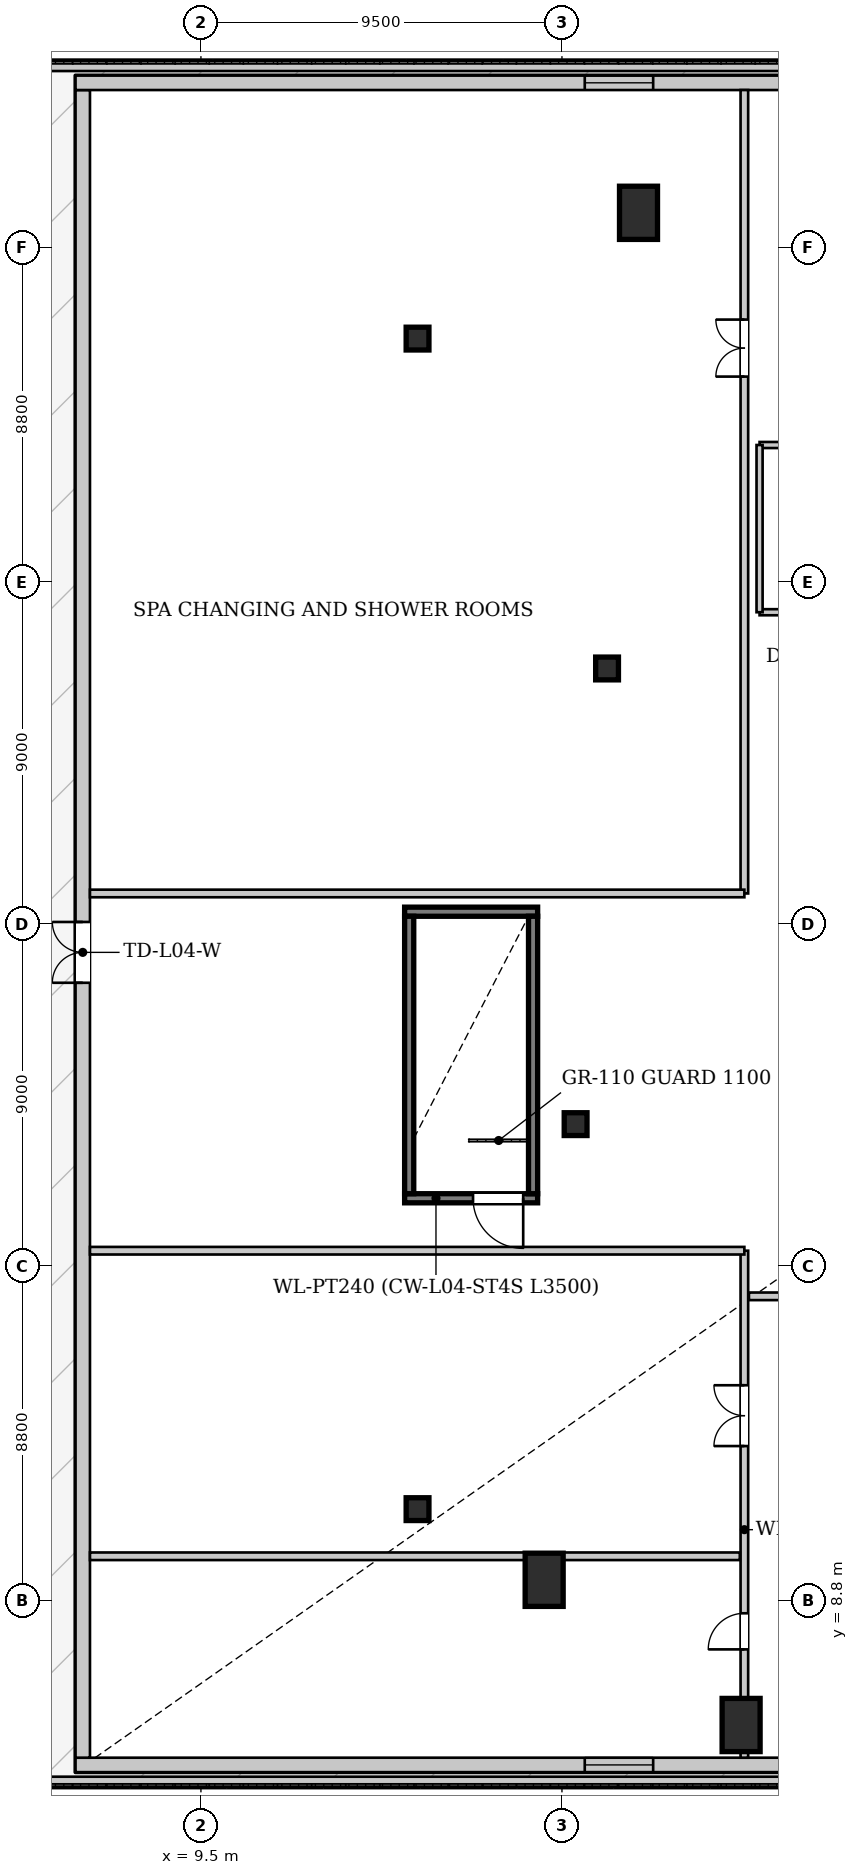
"""IFC4 building model, lengths in metres.
Left out: names, types, materials, properties, quantities, classifications, styles, units other than length and angle.
Written with IfcOpenShell. Run it as: python <this file> out.ifc"""

import sys

from ifc_helpers import new_model, si_unit, direction, frame, frame_2d, origin, origin_2d, place, context, subcontext, project, spatial, rectangle, hollow_rectangle, extrude, source, transform, mapped, element, fill, save


model = new_model("IFC4")
c1 = context("Model", 3, precision=1e-05, world=origin(), true_north=direction((0.0, 1.0)))
c2 = subcontext(c1, "Body", "Model", "MODEL_VIEW")
j1 = project(units=[si_unit("LENGTHUNIT", "METRE"), si_unit("PLANEANGLEUNIT", "RADIAN")], contexts=[c1])
p1 = place(None, origin())
s1 = spatial("IfcSite", under=j1, at=p1, CompositionType="ELEMENT")
p2 = place(p1, origin())
s2 = spatial("IfcBuilding", under=s1, at=p2, CompositionType="ELEMENT")
p3 = place(p2, frame((0.0, 0.0, 20.1)))
s3 = spatial("IfcBuildingStorey", under=s2, at=p3, CompositionType="ELEMENT", Elevation=20.1)
m1 = source(origin(), c2, "Body", "SweptSolid", [
    extrude(rectangle(XDim=1.0, YDim=1.4, at=origin_2d()), origin(), (0.0, 0.0, 1.0), 4.335),
])
for number, where, z_axis, x_axis in (
    (1, (21.014, 45.309, 0.0), (0.0, 0.0, 1.0), (1.0, 0.0, 0.0)),
    (2, (18.532, 9.341, 0.0), (0.0, 0.0, 1.0), (1.0, 0.0, 0.0)),
    (3, (23.714, 5.52, 0.0), (0.0, 0.0, 1.0), (1.0, 0.0, 0.0)),
):
    element("IfcColumn", number, at=place(p3, frame(where, z_axis=z_axis, x_axis=x_axis)), inside=s3, PredefinedType="COLUMN", context=c2, shape_type="MappedRepresentation", body=[
        mapped(m1, transform((0.0, 0.0, 0.0), x_axis=(1.0, 0.0, 0.0), y_axis=(0.0, 1.0, 0.0), z_axis=(0.0, 0.0, 1.0), scale=1.0)),
    ])
m2 = source(origin(), c2, "Body", "SweptSolid", [
    extrude(hollow_rectangle(XDim=0.6, YDim=0.6, WallThickness=0.035, at=origin_2d()), origin(), (0.0, 0.0, 1.0), 4.335),
])
for number, where, z_axis, x_axis in (
    (4, (15.2, 11.2, 0.0), (0.0, 0.0, 1.0), (1.0, 0.0, 0.0)),
    (5, (15.2, 42.0, 0.0), (0.0, 0.0, 1.0), (1.0, 0.0, 0.0)),
):
    element("IfcColumn", number, at=place(p3, frame(where, z_axis=z_axis, x_axis=x_axis)), inside=s3, PredefinedType="COLUMN", context=c2, shape_type="MappedRepresentation", body=[
        mapped(m2, transform((0.0, 0.0, 0.0), x_axis=(1.0, 0.0, 0.0), y_axis=(0.0, 1.0, 0.0), z_axis=(0.0, 0.0, 1.0), scale=1.0)),
    ])
m3 = source(origin(), c2, "Body", "SweptSolid", [
    extrude(hollow_rectangle(XDim=0.6, YDim=0.6, WallThickness=0.035, at=origin_2d()), origin(), (0.0, 0.0, 1.0), 3.28),
])
for number, where, z_axis, x_axis in (
    (6, (20.187, 33.32, 0.0), (0.0, 0.0, 1.0), (1.0, 0.0, 0.0)),
    (7, (19.359, 21.331, 0.0), (0.0, 0.0, 1.0), (1.0, 0.0, 0.0)),
):
    element("IfcColumn", number, at=place(p3, frame(where, z_axis=z_axis, x_axis=x_axis)), inside=s3, PredefinedType="COLUMN", context=c2, shape_type="MappedRepresentation", body=[
        mapped(m3, transform((0.0, 0.0, 0.0), x_axis=(1.0, 0.0, 0.0), y_axis=(0.0, 1.0, 0.0), z_axis=(0.0, 0.0, 1.0), scale=1.0)),
    ])
p4 = place(p3, frame((34.8, 4.47, 0.0), z_axis=(0.0, 0.0, 1.0), x_axis=(-1.0, 0.0, 0.0)))
e8 = element("IfcWall", 8, at=p4, inside=s3, PredefinedType="SOLIDWALL", context=c2, shape_type="SweptSolid", body=[
    extrude(rectangle(XDim=28.6, YDim=0.38, at=frame_2d((14.3, 0.0))), origin(), (0.0, 0.0, 1.0), 3.2),
])
p5 = place(p4, frame((13.4, 0.0, 0.68)))
e9 = element("IfcOpeningElement", 9, at=p5, cuts=e8, PredefinedType="OPENING", context=c2, shape_type="SweptSolid", body=[
    extrude(rectangle(XDim=1.8, YDim=2.4, at=frame_2d((0.9, 1.2))), frame((0.0, 0.2, 0.0), z_axis=(0.0, -1.0, 0.0), x_axis=(1.0, 0.0, 0.0)), (0.0, 0.0, 1.0), 0.4),
])
p6 = place(p3, frame((6.39, 4.66, 0.0), z_axis=(0.0, 0.0, 1.0), x_axis=(0.0, 1.0, 0.0)))
e10 = element("IfcWall", 10, at=p6, inside=s3, PredefinedType="SOLIDWALL", context=c2, shape_type="SweptSolid", body=[
    extrude(rectangle(XDim=43.88, YDim=0.38, at=frame_2d((21.94, 0.0))), origin(), (0.0, 0.0, 1.0), 3.2),
])
p7 = place(p6, frame((20.39, 0.0, 0.0)))
e11 = element("IfcOpeningElement", 11, at=p7, cuts=e10, PredefinedType="OPENING", context=c2, shape_type="SweptSolid", body=[
    extrude(rectangle(XDim=1.6, YDim=2.3, at=frame_2d((0.8, 1.15))), frame((0.0, 0.2, 0.0), z_axis=(0.0, -1.0, 0.0), x_axis=(1.0, 0.0, 0.0)), (0.0, 0.0, 1.0), 0.4),
])
p8 = place(p3, frame((6.2, 48.73, 0.0), z_axis=(0.0, 0.0, 1.0), x_axis=(1.0, 0.0, 0.0)))
e12 = element("IfcWall", 12, at=p8, inside=s3, PredefinedType="SOLIDWALL", context=c2, shape_type="SweptSolid", body=[
    extrude(rectangle(XDim=28.6, YDim=0.38, at=frame_2d((14.3, 0.0))), origin(), (0.0, 0.0, 1.0), 3.2),
])
p9 = place(p8, frame((13.4, 0.0, 0.68)))
e13 = element("IfcOpeningElement", 13, at=p9, cuts=e12, PredefinedType="OPENING", context=c2, shape_type="SweptSolid", body=[
    extrude(rectangle(XDim=1.8, YDim=2.4, at=frame_2d((0.9, 1.2))), frame((0.0, 0.2, 0.0), z_axis=(0.0, -1.0, 0.0), x_axis=(1.0, 0.0, 0.0)), (0.0, 0.0, 1.0), 0.4),
])
for number, where, z_axis, x_axis in (
    (14, (5.35, 4.02, 0.0), (0.0, 0.0, 1.0), (1.0, 0.0, 0.0)),
    (15, (5.35, 49.18, 0.0), (0.0, 0.0, 1.0), (1.0, 0.0, 0.0)),
):
    element("IfcWall", number, at=place(p3, frame(where, z_axis=z_axis, x_axis=x_axis)), inside=s3, PredefinedType="PARAPET", context=c2, shape_type="SweptSolid", body=[
        extrude(rectangle(XDim=65.3, YDim=0.28, at=frame_2d((32.65, 0.0))), origin(), (0.0, 0.0, 1.0), 0.45),
    ])
p10 = place(p3, frame((18.36, 19.38, 0.0), z_axis=(0.0, 0.0, 1.0), x_axis=(-1.0, 0.0, 0.0)))
e16 = element("IfcWall", 16, at=p10, inside=s3, PredefinedType="PARTITIONING", context=c2, shape_type="SweptSolid", body=[
    extrude(rectangle(XDim=3.5, YDim=0.24, at=frame_2d((1.75, 0.0))), origin(), (0.0, 0.0, 1.0), 4.08),
])
p11 = place(p10, frame((0.38, 0.0, 0.0)))
e17 = element("IfcOpeningElement", 17, at=p11, cuts=e16, PredefinedType="OPENING", context=c2, shape_type="SweptSolid", body=[
    extrude(rectangle(XDim=1.32, YDim=2.2, at=frame_2d((0.66, 1.1))), frame((0.0, 0.13, 0.0), z_axis=(0.0, -1.0, 0.0), x_axis=(1.0, 0.0, 0.0)), (0.0, 0.0, 1.0), 0.26),
])
p12 = place(p3, frame((14.86, 26.92, 0.0), z_axis=(0.0, 0.0, 1.0), x_axis=(1.0, 0.0, 0.0)))
e18 = element("IfcWall", 18, at=p12, inside=s3, PredefinedType="PARTITIONING", context=c2, shape_type="SweptSolid", body=[
    extrude(rectangle(XDim=3.5, YDim=0.24, at=frame_2d((1.75, 0.0))), origin(), (0.0, 0.0, 1.0), 4.08),
])
for number, where, z_axis, x_axis in (
    (19, (14.98, 19.5, 0.0), (0.0, 0.0, 1.0), (0.0, 1.0, 0.0)),
    (20, (18.24, 26.8, 0.0), (0.0, 0.0, 1.0), (0.0, -1.0, 0.0)),
):
    element("IfcWall", number, at=place(p3, frame(where, z_axis=z_axis, x_axis=x_axis)), inside=s3, PredefinedType="PARTITIONING", context=c2, shape_type="SweptSolid", body=[
        extrude(rectangle(XDim=7.3, YDim=0.24, at=frame_2d((3.65, 0.0))), origin(), (0.0, 0.0, 1.0), 4.08),
    ])
p13 = place(p3, frame((23.8, 4.66, 0.0), z_axis=(0.0, 0.0, 1.0), x_axis=(0.0, 1.0, 0.0)))
e21 = element("IfcWall", 21, at=p13, inside=s3, PredefinedType="PARTITIONING", context=c2, shape_type="SweptSolid", body=[
    extrude(rectangle(XDim=13.34, YDim=0.2, at=frame_2d((6.67, 0.0))), origin(), (0.0, 0.0, 1.0), 3.43),
])
p14 = place(p13, frame((2.85, 0.0, 0.0)))
e22 = element("IfcOpeningElement", 22, at=p14, cuts=e21, PredefinedType="OPENING", context=c2, shape_type="SweptSolid", body=[
    extrude(rectangle(XDim=0.95, YDim=2.1, at=frame_2d((0.475, 1.05))), frame((0.0, 0.11, 0.0), z_axis=(0.0, -1.0, 0.0), x_axis=(1.0, 0.0, 0.0)), (0.0, 0.0, 1.0), 0.22),
])
p15 = place(p13, frame((8.2, 0.0, 0.0)))
e23 = element("IfcOpeningElement", 23, at=p15, cuts=e21, PredefinedType="OPENING", context=c2, shape_type="SweptSolid", body=[
    extrude(rectangle(XDim=1.6, YDim=2.2, at=frame_2d((0.8, 1.1))), frame((0.0, 0.11, 0.0), z_axis=(0.0, -1.0, 0.0), x_axis=(1.0, 0.0, 0.0)), (0.0, 0.0, 1.0), 0.22),
])
p16 = place(p3, frame((6.58, 9.96, 0.0), z_axis=(0.0, 0.0, 1.0), x_axis=(1.0, 0.0, 0.0)))
e24 = element("IfcWall", 24, at=p16, inside=s3, PredefinedType="PARTITIONING", context=c2, shape_type="SweptSolid", body=[
    extrude(rectangle(XDim=17.1, YDim=0.2, at=frame_2d((8.55, 0.0))), origin(), (0.0, 0.0, 1.0), 3.43),
])
p17 = place(p3, frame((6.58, 18.0, 0.0), z_axis=(0.0, 0.0, 1.0), x_axis=(1.0, 0.0, 0.0)))
e25 = element("IfcWall", 25, at=p17, inside=s3, PredefinedType="PARTITIONING", context=c2, shape_type="SweptSolid", body=[
    extrude(rectangle(XDim=17.22, YDim=0.2, at=frame_2d((8.61, 0.0))), origin(), (0.0, 0.0, 1.0), 3.43),
])
p18 = place(p3, frame((23.8, 27.4, 0.0), z_axis=(0.0, 0.0, 1.0), x_axis=(0.0, 1.0, 0.0)))
e26 = element("IfcWall", 26, at=p18, inside=s3, PredefinedType="PARTITIONING", context=c2, shape_type="SweptSolid", body=[
    extrude(rectangle(XDim=21.14, YDim=0.2, at=frame_2d((10.57, 0.0))), origin(), (0.0, 0.0, 1.0), 3.43),
])
p19 = place(p18, frame((13.6, 0.0, 0.0)))
e27 = element("IfcOpeningElement", 27, at=p19, cuts=e26, PredefinedType="OPENING", context=c2, shape_type="SweptSolid", body=[
    extrude(rectangle(XDim=1.5, YDim=2.25, at=frame_2d((0.75, 1.125))), frame((0.0, 0.11, 0.0), z_axis=(0.0, -1.0, 0.0), x_axis=(1.0, 0.0, 0.0)), (0.0, 0.0, 1.0), 0.22),
])
p20 = place(p3, frame((6.58, 27.4, 0.0), z_axis=(0.0, 0.0, 1.0), x_axis=(1.0, 0.0, 0.0)))
e28 = element("IfcWall", 28, at=p20, inside=s3, PredefinedType="PARTITIONING", context=c2, shape_type="SweptSolid", body=[
    extrude(rectangle(XDim=17.22, YDim=0.2, at=frame_2d((8.61, 0.0))), origin(), (0.0, 0.0, 1.0), 3.43),
])
p21 = place(p3, frame((23.92, 16.8, 0.0), z_axis=(0.0, 0.0, 1.0), x_axis=(1.0, 0.0, 0.0)))
e29 = element("IfcWall", 29, at=p21, inside=s3, PredefinedType="PARTITIONING", context=c2, shape_type="SweptSolid", body=[
    extrude(rectangle(XDim=28.16, YDim=0.2, at=frame_2d((14.08, 0.0))), origin(), (0.0, 0.0, 1.0), 3.43),
])
p22 = place(p21, frame((13.5, 0.0, 0.0)))
e30 = element("IfcOpeningElement", 30, at=p22, cuts=e29, PredefinedType="OPENING", context=c2, shape_type="SweptSolid", body=[
    extrude(rectangle(XDim=1.6, YDim=2.2, at=frame_2d((0.8, 1.1))), frame((0.0, 0.11, 0.0), z_axis=(0.0, -1.0, 0.0), x_axis=(1.0, 0.0, 0.0)), (0.0, 0.0, 1.0), 0.22),
])
p23 = place(p3, frame((24.2, 34.8, 0.0), z_axis=(0.0, 0.0, 1.0), x_axis=(1.0, 0.0, 0.0)))
e31 = element("IfcWall", 31, at=p23, inside=s3, PredefinedType="PARTITIONING", context=c2, shape_type="SweptSolid", body=[
    extrude(rectangle(XDim=6.6, YDim=0.16, at=frame_2d((3.3, 0.0))), origin(), (0.0, 0.0, 1.0), 3.43),
])
p24 = place(p23, frame((1.0, 0.0, 0.0)))
e32 = element("IfcOpeningElement", 32, at=p24, cuts=e31, PredefinedType="OPENING", context=c2, shape_type="SweptSolid", body=[
    extrude(rectangle(XDim=0.9, YDim=2.1, at=frame_2d((0.45, 1.05))), frame((0.0, 0.09, 0.0), z_axis=(0.0, -1.0, 0.0), x_axis=(1.0, 0.0, 0.0)), (0.0, 0.0, 1.0), 0.18),
])
p25 = place(p23, frame((4.4, 0.0, 0.0)))
e33 = element("IfcOpeningElement", 33, at=p25, cuts=e31, PredefinedType="OPENING", context=c2, shape_type="SweptSolid", body=[
    extrude(rectangle(XDim=0.9, YDim=2.1, at=frame_2d((0.45, 1.05))), frame((0.0, 0.09, 0.0), z_axis=(0.0, -1.0, 0.0), x_axis=(1.0, 0.0, 0.0)), (0.0, 0.0, 1.0), 0.18),
])
p26 = place(p3, frame((24.2, 39.2, 0.0), z_axis=(0.0, 0.0, 1.0), x_axis=(1.0, 0.0, 0.0)))
e34 = element("IfcWall", 34, at=p26, inside=s3, PredefinedType="PARTITIONING", context=c2, shape_type="SweptSolid", body=[
    extrude(rectangle(XDim=6.6, YDim=0.16, at=frame_2d((3.3, 0.0))), origin(), (0.0, 0.0, 1.0), 3.43),
])
p27 = place(p3, frame((24.2, 34.8, 0.0), z_axis=(0.0, 0.0, 1.0), x_axis=(0.0, 1.0, 0.0)))
e35 = element("IfcWall", 35, at=p27, inside=s3, PredefinedType="PARTITIONING", context=c2, shape_type="SweptSolid", body=[
    extrude(rectangle(XDim=4.4, YDim=0.16, at=frame_2d((2.2, 0.0))), origin(), (0.0, 0.0, 1.0), 3.43),
])
m4 = source(origin(), c2, "Body", "SweptSolid", [
    extrude(rectangle(XDim=1.6, YDim=2.3, at=frame_2d((0.8, 1.15))), frame((0.0, 0.025, 0.0), z_axis=(0.0, -1.0, 0.0), x_axis=(1.0, 0.0, 0.0)), (0.0, 0.0, 1.0), 0.05),
])
p28 = place(p7, origin())
e36 = element("IfcDoor", 36, at=p28, inside=s3, OperationType="DOUBLE_DOOR_SINGLE_SWING", PredefinedType="DOOR", context=c2, shape_type="MappedRepresentation", body=[
    mapped(m4, transform((0.0, 0.0, 0.0), x_axis=(1.0, 0.0, 0.0), y_axis=(0.0, 1.0, 0.0), z_axis=(0.0, 0.0, 1.0), scale=1.0)),
])
fill(e11, e36)
m5 = source(origin(), c2, "Body", "SweptSolid", [
    extrude(rectangle(XDim=1.8, YDim=2.4, at=frame_2d((0.9, 1.2))), frame((0.0, 0.03, 0.0), z_axis=(0.0, -1.0, 0.0), x_axis=(1.0, 0.0, 0.0)), (0.0, 0.0, 1.0), 0.06),
])
p29 = place(p5, origin())
e37 = element("IfcWindow", 37, at=p29, inside=s3, PartitioningType="SINGLE_PANEL", PredefinedType="WINDOW", context=c2, shape_type="MappedRepresentation", body=[
    mapped(m5, transform((0.0, 0.0, 0.0), x_axis=(1.0, 0.0, 0.0), y_axis=(0.0, 1.0, 0.0), z_axis=(0.0, 0.0, 1.0), scale=1.0)),
])
fill(e9, e37)
p30 = place(p9, origin())
e38 = element("IfcWindow", 38, at=p30, inside=s3, PartitioningType="SINGLE_PANEL", PredefinedType="WINDOW", context=c2, shape_type="MappedRepresentation", body=[
    mapped(m5, transform((0.0, 0.0, 0.0), x_axis=(1.0, 0.0, 0.0), y_axis=(0.0, 1.0, 0.0), z_axis=(0.0, 0.0, 1.0), scale=1.0)),
])
fill(e13, e38)
m6 = source(origin(), c2, "Body", "SweptSolid", [
    extrude(rectangle(XDim=1.32, YDim=2.2, at=frame_2d((0.66, 1.1))), frame((0.0, 0.025, 0.0), z_axis=(0.0, -1.0, 0.0), x_axis=(1.0, 0.0, 0.0)), (0.0, 0.0, 1.0), 0.05),
])
p31 = place(p11, origin())
e39 = element("IfcDoor", 39, at=p31, inside=s3, OperationType="SINGLE_SWING_LEFT", PredefinedType="DOOR", context=c2, shape_type="MappedRepresentation", body=[
    mapped(m6, transform((0.0, 0.0, 0.0), x_axis=(1.0, 0.0, 0.0), y_axis=(0.0, 1.0, 0.0), z_axis=(0.0, 0.0, 1.0), scale=1.0)),
])
fill(e17, e39)
m7 = source(origin(), c2, "Body", "SweptSolid", [
    extrude(rectangle(XDim=0.95, YDim=2.1, at=frame_2d((0.475, 1.05))), frame((0.0, 0.025, 0.0), z_axis=(0.0, -1.0, 0.0), x_axis=(1.0, 0.0, 0.0)), (0.0, 0.0, 1.0), 0.05),
])
p32 = place(p14, origin())
e40 = element("IfcDoor", 40, at=p32, inside=s3, OperationType="SINGLE_SWING_LEFT", PredefinedType="DOOR", context=c2, shape_type="MappedRepresentation", body=[
    mapped(m7, transform((0.0, 0.0, 0.0), x_axis=(1.0, 0.0, 0.0), y_axis=(0.0, 1.0, 0.0), z_axis=(0.0, 0.0, 1.0), scale=1.0)),
])
fill(e22, e40)
m8 = source(origin(), c2, "Body", "SweptSolid", [
    extrude(rectangle(XDim=1.6, YDim=2.2, at=frame_2d((0.8, 1.1))), frame((0.0, 0.025, 0.0), z_axis=(0.0, -1.0, 0.0), x_axis=(1.0, 0.0, 0.0)), (0.0, 0.0, 1.0), 0.05),
])
p33 = place(p15, origin())
e41 = element("IfcDoor", 41, at=p33, inside=s3, OperationType="DOUBLE_DOOR_SINGLE_SWING", PredefinedType="DOOR", context=c2, shape_type="MappedRepresentation", body=[
    mapped(m8, transform((0.0, 0.0, 0.0), x_axis=(1.0, 0.0, 0.0), y_axis=(0.0, 1.0, 0.0), z_axis=(0.0, 0.0, 1.0), scale=1.0)),
])
fill(e23, e41)
m9 = source(origin(), c2, "Body", "SweptSolid", [
    extrude(rectangle(XDim=1.5, YDim=2.25, at=frame_2d((0.75, 1.125))), frame((0.0, 0.025, 0.0), z_axis=(0.0, -1.0, 0.0), x_axis=(1.0, 0.0, 0.0)), (0.0, 0.0, 1.0), 0.05),
])
p34 = place(p19, origin())
e42 = element("IfcDoor", 42, at=p34, inside=s3, OperationType="DOUBLE_DOOR_SINGLE_SWING", PredefinedType="DOOR", context=c2, shape_type="MappedRepresentation", body=[
    mapped(m9, transform((0.0, 0.0, 0.0), x_axis=(1.0, 0.0, 0.0), y_axis=(0.0, 1.0, 0.0), z_axis=(0.0, 0.0, 1.0), scale=1.0)),
])
fill(e27, e42)
save(model, sys.argv[1])
